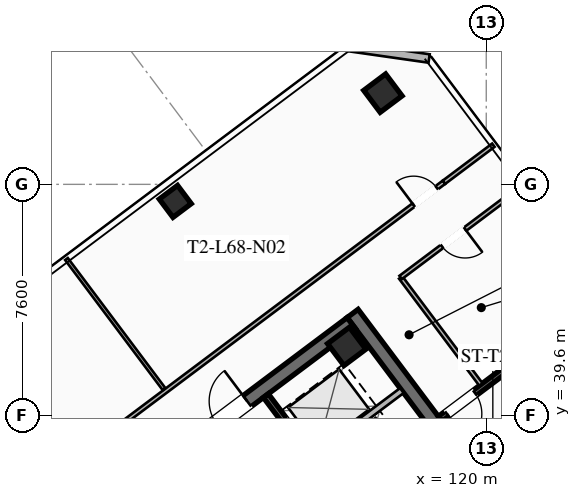
"""IFC4 building model, lengths in metres.
Left out: names, types, materials, properties, quantities, classifications, styles, units other than length and angle.
Written with IfcOpenShell. Run it as: python <this file> out.ifc"""

import sys

from ifc_helpers import new_model, si_unit, direction, frame, frame_2d, origin, origin_2d, place, context, subcontext, project, spatial, rectangle, hollow_rectangle, extrude, element, fill, save


model = new_model("IFC4")
c1 = context("Model", 3, precision=1e-05, world=origin(), true_north=direction((0.0, 1.0)))
c2 = subcontext(c1, "Body", "Model", "MODEL_VIEW")
j1 = project(units=[si_unit("LENGTHUNIT", "METRE"), si_unit("PLANEANGLEUNIT", "RADIAN")], contexts=[c1])
p1 = place(None, origin())
s1 = spatial("IfcSite", under=j1, at=p1, CompositionType="ELEMENT")
p2 = place(p1, origin())
s2 = spatial("IfcBuilding", under=s1, at=p2, CompositionType="ELEMENT")
p3 = place(p2, frame((0.0, 0.0, 251.4)))
s3 = spatial("IfcBuildingStorey", under=s2, at=p3, CompositionType="ELEMENT", Elevation=251.4)
p4 = place(p3, frame((115.604, 42.953, 0.0), z_axis=(0.0, 0.0, 1.0), x_axis=(0.600005007985, -0.799996243986, 0.0)))
e1 = element("IfcWall", 1, at=p4, inside=s3, PredefinedType="SHEAR", context=c2, shape_type="SweptSolid", body=[
    extrude(rectangle(XDim=15.6, YDim=0.45, at=frame_2d((7.8, 0.0))), origin(), (0.0, 0.0, 1.0), 4.0),
])
p5 = place(p3, frame((103.351, 33.482, 0.0), z_axis=(0.0, 0.0, 1.0), x_axis=(0.8, 0.6, 0.0)))
e2 = element("IfcWall", 2, at=p5, inside=s3, PredefinedType="SHEAR", context=c2, shape_type="SweptSolid", body=[
    extrude(rectangle(XDim=15.26, YDim=0.45, at=frame_2d((7.63, 0.0))), origin(), (0.0, 0.0, 1.0), 4.0),
])
p6 = place(p5, frame((4.68, 0.0, 0.0)))
e3 = element("IfcOpeningElement", 3, at=p6, cuts=e2, PredefinedType="OPENING", context=c2, shape_type="SweptSolid", body=[
    extrude(rectangle(XDim=1.25, YDim=2.25, at=frame_2d((0.625, 1.125))), frame((0.0, 0.235, 0.0), z_axis=(0.0, -1.0, 0.0), x_axis=(1.0, 0.0, 0.0)), (0.0, 0.0, 1.0), 0.47),
])
p7 = place(p5, frame((9.73, 0.0, 0.0)))
e4 = element("IfcOpeningElement", 4, at=p7, cuts=e2, PredefinedType="OPENING", context=c2, shape_type="SweptSolid", body=[
    extrude(rectangle(XDim=1.25, YDim=2.25, at=frame_2d((0.625, 1.125))), frame((0.0, 0.235, 0.0), z_axis=(0.0, -1.0, 0.0), x_axis=(1.0, 0.0, 0.0)), (0.0, 0.0, 1.0), 0.47),
])
for number, where, z_axis, x_axis in (
    (5, (115.41, 41.87, 0.0), (0.0, 0.0, 1.0), (0.8, 0.6, 0.0)),
    (6, (116.6, 50.2, 0.0), (0.0, 0.0, 1.0), (0.8, 0.6, 0.0)),
):
    element("IfcColumn", number, at=place(p3, frame(where, z_axis=z_axis, x_axis=x_axis)), inside=s3, PredefinedType="COLUMN", context=c2, shape_type="SweptSolid", body=[
        extrude(hollow_rectangle(XDim=0.9, YDim=0.9, WallThickness=0.04, at=origin_2d()), origin(), (0.0, 0.0, 1.0), 3.78),
    ])
p8 = place(p3, frame((109.77, 46.64, 0.0), z_axis=(0.0, 0.0, 1.0), x_axis=(0.799999996291, 0.600000004945, 0.0)))
e7 = element("IfcColumn", 7, at=p8, inside=s3, PredefinedType="COLUMN", context=c2, shape_type="SweptSolid", body=[
    extrude(hollow_rectangle(XDim=0.75, YDim=0.75, WallThickness=0.032, at=origin_2d()), origin(), (0.0, 0.0, 1.0), 3.78),
])
p9 = place(p3, frame((115.46, 51.72, 0.0), z_axis=(0.0, 0.0, 1.0), x_axis=(0.989956760759, -0.141370477216, 0.0)))
e8 = element("IfcWall", 8, at=p9, inside=s3, PredefinedType="SOLIDWALL", context=c2, shape_type="SweptSolid", body=[
    extrude(rectangle(XDim=2.687, YDim=0.28, at=frame_2d((1.344, 0.0))), origin(), (0.0, 0.0, 1.0), 3.78),
])
p10 = place(p3, frame((112.75, 40.25, 0.0), z_axis=(0.0, 0.0, 1.0), x_axis=(0.599994036198, -0.800004472816, 0.0)))
e9 = element("IfcWall", 9, at=p10, inside=s3, PredefinedType="SHEAR", context=c2, shape_type="SweptSolid", body=[
    extrude(rectangle(XDim=6.55, YDim=0.2, at=frame_2d((3.275, 0.0))), origin(), (0.0, 0.0, 1.0), 3.78),
])
p11 = place(p10, frame((5.075, 0.0, 0.0)))
e10 = element("IfcOpeningElement", 10, at=p11, cuts=e9, PredefinedType="OPENING", context=c2, shape_type="SweptSolid", body=[
    extrude(rectangle(XDim=1.1, YDim=2.2, at=frame_2d((0.55, 1.1))), frame((0.0, 0.11, 0.0), z_axis=(0.0, -1.0, 0.0), x_axis=(1.0, 0.0, 0.0)), (0.0, 0.0, 1.0), 0.22),
])
p12 = place(p10, frame((3.025, 0.0, 0.0)))
e11 = element("IfcOpeningElement", 11, at=p12, cuts=e9, PredefinedType="OPENING", context=c2, shape_type="SweptSolid", body=[
    extrude(rectangle(XDim=1.1, YDim=2.2, at=frame_2d((0.55, 1.1))), frame((0.0, 0.11, 0.0), z_axis=(0.0, -1.0, 0.0), x_axis=(1.0, 0.0, 0.0)), (0.0, 0.0, 1.0), 0.22),
])
p13 = place(p10, frame((1.025, 0.0, 0.0)))
e12 = element("IfcOpeningElement", 12, at=p13, cuts=e9, PredefinedType="OPENING", context=c2, shape_type="SweptSolid", body=[
    extrude(rectangle(XDim=1.1, YDim=2.2, at=frame_2d((0.55, 1.1))), frame((0.0, 0.11, 0.0), z_axis=(0.0, -1.0, 0.0), x_axis=(1.0, 0.0, 0.0)), (0.0, 0.0, 1.0), 0.22),
])
p14 = place(p3, frame((114.36, 38.27, 0.0), z_axis=(0.0, 0.0, 1.0), x_axis=(0.800008183455, 0.599989088572, 0.0)))
e13 = element("IfcWall", 13, at=p14, inside=s3, PredefinedType="SOLIDWALL", context=c2, shape_type="SweptSolid", body=[
    extrude(rectangle(XDim=3.58, YDim=0.2, at=frame_2d((1.79, 0.0))), origin(), (0.0, 0.0, 1.0), 3.78),
])
p15 = place(p3, frame((121.204, 41.528, 0.0), z_axis=(0.0, 0.0, 1.0), x_axis=(-0.800017232136, -0.599977023131, 0.0)))
e14 = element("IfcWall", 14, at=p15, inside=s3, PredefinedType="SHEAR", context=c2, shape_type="SweptSolid", body=[
    extrude(rectangle(XDim=3.4, YDim=0.2, at=frame_2d((1.7, 0.0))), origin(), (0.0, 0.0, 1.0), 3.78),
])
p16 = place(p15, frame((1.975, 0.0, 0.0)))
e15 = element("IfcOpeningElement", 15, at=p16, cuts=e14, PredefinedType="OPENING", context=c2, shape_type="SweptSolid", body=[
    extrude(rectangle(XDim=1.15, YDim=2.2, at=frame_2d((0.575, 1.1))), frame((0.0, 0.11, 0.0), z_axis=(0.0, -1.0, 0.0), x_axis=(1.0, 0.0, 0.0)), (0.0, 0.0, 1.0), 0.22),
])
p17 = place(p3, frame((119.824, 40.618, 0.0), z_axis=(0.0, 0.0, 1.0), x_axis=(-0.599982243973, 0.800013316712, 0.0)))
e16 = element("IfcWall", 16, at=p17, inside=s3, PredefinedType="PARTITIONING", context=c2, shape_type="SweptSolid", body=[
    extrude(rectangle(XDim=4.4, YDim=0.135, at=frame_2d((2.2, 0.0))), origin(), (0.0, 0.0, 1.0), 2.971),
])
p18 = place(p3, frame((99.746, 33.122, 0.0), z_axis=(0.0, 0.0, 1.0), x_axis=(0.800001242445, 0.599998343403, 0.0)))
e17 = element("IfcWall", 17, at=p18, inside=s3, PredefinedType="PARTITIONING", context=c2, shape_type="SweptSolid", body=[
    extrude(rectangle(XDim=23.58, YDim=0.135, at=frame_2d((11.79, 0.0))), origin(), (0.0, 0.0, 1.0), 2.971),
])
p19 = place(p18, frame((0.3, 0.0, 0.0)))
e18 = element("IfcOpeningElement", 18, at=p19, cuts=e17, PredefinedType="OPENING", context=c2, shape_type="SweptSolid", body=[
    extrude(rectangle(XDim=0.95, YDim=2.05, at=frame_2d((0.475, 1.025))), frame((0.0, 0.077, 0.0), z_axis=(0.0, -1.0, 0.0), x_axis=(1.0, 0.0, 0.0)), (0.0, 0.0, 1.0), 0.155),
])
p20 = place(p18, frame((22.33, 0.0, 0.0)))
e19 = element("IfcOpeningElement", 19, at=p20, cuts=e17, PredefinedType="OPENING", context=c2, shape_type="SweptSolid", body=[
    extrude(rectangle(XDim=0.95, YDim=2.05, at=frame_2d((0.475, 1.025))), frame((0.0, 0.077, 0.0), z_axis=(0.0, -1.0, 0.0), x_axis=(1.0, 0.0, 0.0)), (0.0, 0.0, 1.0), 0.155),
])
p21 = place(p3, frame((118.61, 47.27, 0.0), z_axis=(0.0, 0.0, 1.0), x_axis=(0.799956698502, 0.600057730991, 0.0)))
e20 = element("IfcWall", 20, at=p21, inside=s3, PredefinedType="PARTITIONING", context=c2, shape_type="SweptSolid", body=[
    extrude(rectangle(XDim=2.03, YDim=0.135, at=frame_2d((1.015, 0.0))), origin(), (0.0, 0.0, 1.0), 2.971),
])
p22 = place(p3, frame((109.402, 40.464, 0.0), z_axis=(0.0, 0.0, 1.0), x_axis=(-0.600043807911, 0.799967142192, 0.0)))
e21 = element("IfcWall", 21, at=p22, inside=s3, PredefinedType="PARTITIONING", context=c2, shape_type="SweptSolid", body=[
    extrude(rectangle(XDim=5.35, YDim=0.11, at=frame_2d((2.675, 0.0))), origin(), (0.0, 0.0, 1.0), 2.971),
])
p23 = place(p3, frame((121.224, 47.168, 0.0), z_axis=(0.0, 0.0, 1.0), x_axis=(-0.8, -0.6, 0.0)))
e22 = element("IfcWall", 22, at=p23, inside=s3, PredefinedType="PARTITIONING", context=c2, shape_type="SweptSolid", body=[
    extrude(rectangle(XDim=5.05, YDim=0.135, at=frame_2d((2.525, 0.0))), origin(), (0.0, 0.0, 1.0), 2.971),
])
p24 = place(p23, frame((2.4, 0.0, 0.0)))
e23 = element("IfcOpeningElement", 23, at=p24, cuts=e22, PredefinedType="OPENING", context=c2, shape_type="SweptSolid", body=[
    extrude(rectangle(XDim=0.95, YDim=2.05, at=frame_2d((0.475, 1.025))), frame((0.0, 0.077, 0.0), z_axis=(0.0, -1.0, 0.0), x_axis=(1.0, 0.0, 0.0)), (0.0, 0.0, 1.0), 0.155),
])
p25 = place(p7, origin())
e24 = element("IfcDoor", 24, at=p25, inside=s3, OperationType="SINGLE_SWING_RIGHT", PredefinedType="DOOR", context=c2, shape_type="SweptSolid", body=[
    extrude(rectangle(XDim=1.25, YDim=2.25, at=frame_2d((0.625, 1.125))), frame((0.0, 0.025, 0.0), z_axis=(0.0, -1.0, 0.0), x_axis=(1.0, 0.0, 0.0)), (0.0, 0.0, 1.0), 0.05),
])
fill(e4, e24)
p26 = place(p16, origin())
e25 = element("IfcDoor", 25, at=p26, inside=s3, OperationType="SINGLE_SWING_RIGHT", PredefinedType="DOOR", context=c2, shape_type="SweptSolid", body=[
    extrude(rectangle(XDim=1.15, YDim=2.2, at=frame_2d((0.575, 1.1))), frame((0.0, 0.025, 0.0), z_axis=(0.0, -1.0, 0.0), x_axis=(1.0, 0.0, 0.0)), (0.0, 0.0, 1.0), 0.05),
])
fill(e15, e25)
p27 = place(p20, origin())
e26 = element("IfcDoor", 26, at=p27, inside=s3, OperationType="SINGLE_SWING_LEFT", PredefinedType="DOOR", context=c2, shape_type="SweptSolid", body=[
    extrude(rectangle(XDim=0.95, YDim=2.05, at=frame_2d((0.475, 1.025))), frame((0.0, 0.025, 0.0), z_axis=(0.0, -1.0, 0.0), x_axis=(1.0, 0.0, 0.0)), (0.0, 0.0, 1.0), 0.05),
])
fill(e19, e26)
p28 = place(p24, origin())
e27 = element("IfcDoor", 27, at=p28, inside=s3, OperationType="SINGLE_SWING_LEFT", PredefinedType="DOOR", context=c2, shape_type="SweptSolid", body=[
    extrude(rectangle(XDim=0.95, YDim=2.05, at=frame_2d((0.475, 1.025))), frame((0.0, 0.025, 0.0), z_axis=(0.0, -1.0, 0.0), x_axis=(1.0, 0.0, 0.0)), (0.0, 0.0, 1.0), 0.05),
])
fill(e23, e27)
save(model, sys.argv[1])
